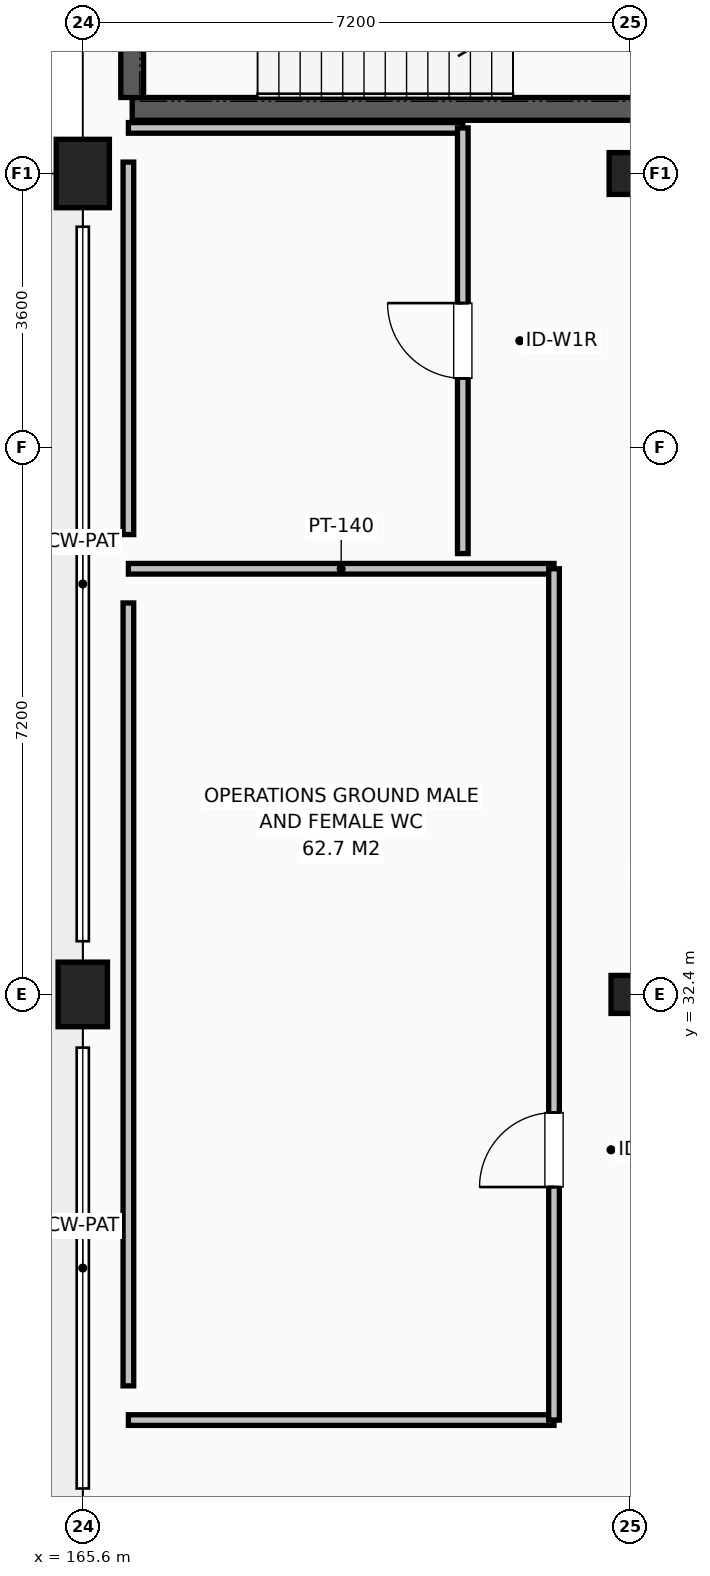
"""IFC4 building model, lengths in metres.
Left out: names, types, materials, properties, quantities, classifications, styles, units other than length and angle.
Written with IfcOpenShell. Run it as: python <this file> out.ifc"""

import sys

from ifc_helpers import new_model, si_unit, direction, frame, frame_2d, origin, origin_2d, place, context, subcontext, project, spatial, rectangle, extrude, element, fill, save


model = new_model("IFC4")
c1 = context("Model", 3, precision=1e-05, world=origin(), true_north=direction((0.0, 1.0)))
c2 = subcontext(c1, "Body", "Model", "MODEL_VIEW")
j1 = project(units=[si_unit("LENGTHUNIT", "METRE"), si_unit("PLANEANGLEUNIT", "RADIAN")], contexts=[c1])
p1 = place(None, origin())
s1 = spatial("IfcSite", under=j1, at=p1, CompositionType="ELEMENT")
p2 = place(p1, origin())
s2 = spatial("IfcBuilding", under=s1, at=p2, CompositionType="ELEMENT")
p3 = place(p2, origin())
s3 = spatial("IfcBuildingStorey", under=s2, at=p3, CompositionType="ELEMENT", Elevation=0.0)
p4 = place(p3, frame((165.6, 32.4, 0.0), z_axis=(0.0, 0.0, 1.0), x_axis=(1.0, 0.0, 0.0)))
e1 = element("IfcColumn", 1, at=p4, inside=s3, PredefinedType="COLUMN", context=c2, shape_type="SweptSolid", body=[
    extrude(rectangle(XDim=0.65, YDim=0.85, at=origin_2d()), origin(), (0.0, 0.0, 1.0), 4.8),
])
p5 = place(p3, frame((165.6, 43.2, 0.0), z_axis=(0.0, 0.0, 1.0), x_axis=(1.0, 0.0, 0.0)))
e2 = element("IfcColumn", 2, at=p5, inside=s3, PredefinedType="COLUMN", context=c2, shape_type="SweptSolid", body=[
    extrude(rectangle(XDim=0.7, YDim=0.9, at=origin_2d()), origin(), (0.0, 0.0, 1.0), 4.8),
])
p6 = place(p3, frame((172.8, 32.4, 0.0), z_axis=(0.0, 0.0, 1.0), x_axis=(1.0, 0.0, 0.0)))
e3 = element("IfcColumn", 3, at=p6, inside=s3, PredefinedType="COLUMN", context=c2, shape_type="SweptSolid", body=[
    extrude(rectangle(XDim=0.5, YDim=0.5, at=origin_2d()), origin(), (0.0, 0.0, 1.0), 4.8),
])
p7 = place(p3, frame((172.8, 43.2, 0.0), z_axis=(0.0, 0.0, 1.0), x_axis=(1.0, 0.0, 0.0)))
e4 = element("IfcColumn", 4, at=p7, inside=s3, PredefinedType="COLUMN", context=c2, shape_type="SweptSolid", body=[
    extrude(rectangle(XDim=0.55, YDim=0.55, at=origin_2d()), origin(), (0.0, 0.0, 1.0), 4.8),
])
p8 = place(p3, frame((166.25, 44.05, 0.0), z_axis=(0.0, 0.0, 1.0), x_axis=(1.0, 0.0, 0.0)))
e5 = element("IfcWall", 5, at=p8, inside=s3, PredefinedType="SHEAR", context=c2, shape_type="SweptSolid", body=[
    extrude(rectangle(XDim=7.1, YDim=0.3, at=frame_2d((3.55, 0.0))), origin(), (0.0, 0.0, 1.0), 4.525),
])
p9 = place(p3, frame((166.25, 47.1, 0.0), z_axis=(0.0, 0.0, 1.0), x_axis=(0.0, -1.0, 0.0)))
e6 = element("IfcWall", 6, at=p9, inside=s3, PredefinedType="SHEAR", context=c2, shape_type="SweptSolid", body=[
    extrude(rectangle(XDim=2.9, YDim=0.3, at=frame_2d((1.45, 0.0))), origin(), (0.0, 0.0, 1.0), 4.525),
])
p10 = place(p9, frame((0.75, 0.0, 0.0)))
e7 = element("IfcOpeningElement", 7, at=p10, cuts=e6, PredefinedType="OPENING", context=c2, shape_type="SweptSolid", body=[
    extrude(rectangle(XDim=1.05, YDim=2.15, at=frame_2d((0.525, 1.075))), frame((0.0, 0.16, 0.0), z_axis=(0.0, -1.0, 0.0), x_axis=(1.0, 0.0, 0.0)), (0.0, 0.0, 1.0), 0.32),
])
for number, where, z_axis, x_axis in (
    (8, (166.2, 38.0, 0.0), (0.0, 0.0, 1.0), (1.0, 0.0, 0.0)),
    (9, (171.8, 26.8, 0.0), (0.0, 0.0, 1.0), (-1.0, 0.0, 0.0)),
):
    element("IfcWall", number, at=place(p3, frame(where, z_axis=z_axis, x_axis=x_axis)), inside=s3, PredefinedType="PARTITIONING", context=c2, shape_type="SweptSolid", body=[
        extrude(rectangle(XDim=5.6, YDim=0.14, at=frame_2d((2.8, 0.0))), origin(), (0.0, 0.0, 1.0), 3.8),
    ])
p11 = place(p3, frame((166.2, 37.55, 0.0), z_axis=(0.0, 0.0, 1.0), x_axis=(0.0, -1.0, 0.0)))
e10 = element("IfcWall", 10, at=p11, inside=s3, PredefinedType="PARTITIONING", context=c2, shape_type="SweptSolid", body=[
    extrude(rectangle(XDim=10.3, YDim=0.14, at=frame_2d((5.15, 0.0))), origin(), (0.0, 0.0, 1.0), 3.8),
])
p12 = place(p3, frame((171.8, 26.8, 0.0), z_axis=(0.0, 0.0, 1.0), x_axis=(0.0, 1.0, 0.0)))
e11 = element("IfcWall", 11, at=p12, inside=s3, PredefinedType="PARTITIONING", context=c2, shape_type="SweptSolid", body=[
    extrude(rectangle(XDim=11.2, YDim=0.14, at=frame_2d((5.6, 0.0))), origin(), (0.0, 0.0, 1.0), 3.8),
])
p13 = place(p12, frame((3.066, 0.0, 0.0)))
e12 = element("IfcOpeningElement", 12, at=p13, cuts=e11, PredefinedType="OPENING", context=c2, shape_type="SweptSolid", body=[
    extrude(rectangle(XDim=0.98, YDim=2.15, at=frame_2d((0.49, 1.075))), frame((0.0, 0.08, 0.0), z_axis=(0.0, -1.0, 0.0), x_axis=(1.0, 0.0, 0.0)), (0.0, 0.0, 1.0), 0.16),
])
p14 = place(p3, frame((166.2, 43.8, 0.0), z_axis=(0.0, 0.0, 1.0), x_axis=(1.0, 0.0, 0.0)))
e13 = element("IfcWall", 13, at=p14, inside=s3, PredefinedType="PARTITIONING", context=c2, shape_type="SweptSolid", body=[
    extrude(rectangle(XDim=4.4, YDim=0.14, at=frame_2d((2.2, 0.0))), origin(), (0.0, 0.0, 1.0), 3.8),
])
p15 = place(p3, frame((166.2, 43.35, 0.0), z_axis=(0.0, 0.0, 1.0), x_axis=(0.0, -1.0, 0.0)))
e14 = element("IfcWall", 14, at=p15, inside=s3, PredefinedType="PARTITIONING", context=c2, shape_type="SweptSolid", body=[
    extrude(rectangle(XDim=4.9, YDim=0.14, at=frame_2d((2.45, 0.0))), origin(), (0.0, 0.0, 1.0), 3.707),
])
p16 = place(p3, frame((170.6, 38.2, 0.0), z_axis=(0.0, 0.0, 1.0), x_axis=(0.0, 1.0, 0.0)))
e15 = element("IfcWall", 15, at=p16, inside=s3, PredefinedType="PARTITIONING", context=c2, shape_type="SweptSolid", body=[
    extrude(rectangle(XDim=5.6, YDim=0.14, at=frame_2d((2.8, 0.0))), origin(), (0.0, 0.0, 1.0), 3.707),
])
p17 = place(p16, frame((2.305, 0.0, 0.0)))
e16 = element("IfcOpeningElement", 16, at=p17, cuts=e15, PredefinedType="OPENING", context=c2, shape_type="SweptSolid", body=[
    extrude(rectangle(XDim=0.99, YDim=2.15, at=frame_2d((0.495, 1.075))), frame((0.0, 0.08, 0.0), z_axis=(0.0, -1.0, 0.0), x_axis=(1.0, 0.0, 0.0)), (0.0, 0.0, 1.0), 0.16),
])
p18 = place(p13, origin())
e17 = element("IfcDoor", 17, at=p18, inside=s3, OperationType="SINGLE_SWING_LEFT", PredefinedType="DOOR", context=c2, shape_type="SweptSolid", body=[
    extrude(rectangle(XDim=0.98, YDim=2.15, at=frame_2d((0.49, 1.075))), frame((0.0, 0.025, 0.0), z_axis=(0.0, -1.0, 0.0), x_axis=(1.0, 0.0, 0.0)), (0.0, 0.0, 1.0), 0.05),
])
fill(e12, e17)
p19 = place(p17, origin())
e18 = element("IfcDoor", 18, at=p19, inside=s3, OperationType="SINGLE_SWING_RIGHT", PredefinedType="DOOR", context=c2, shape_type="SweptSolid", body=[
    extrude(rectangle(XDim=0.99, YDim=2.15, at=frame_2d((0.495, 1.075))), frame((0.0, 0.025, 0.0), z_axis=(0.0, -1.0, 0.0), x_axis=(1.0, 0.0, 0.0)), (0.0, 0.0, 1.0), 0.05),
])
fill(e16, e18)
save(model, sys.argv[1])
